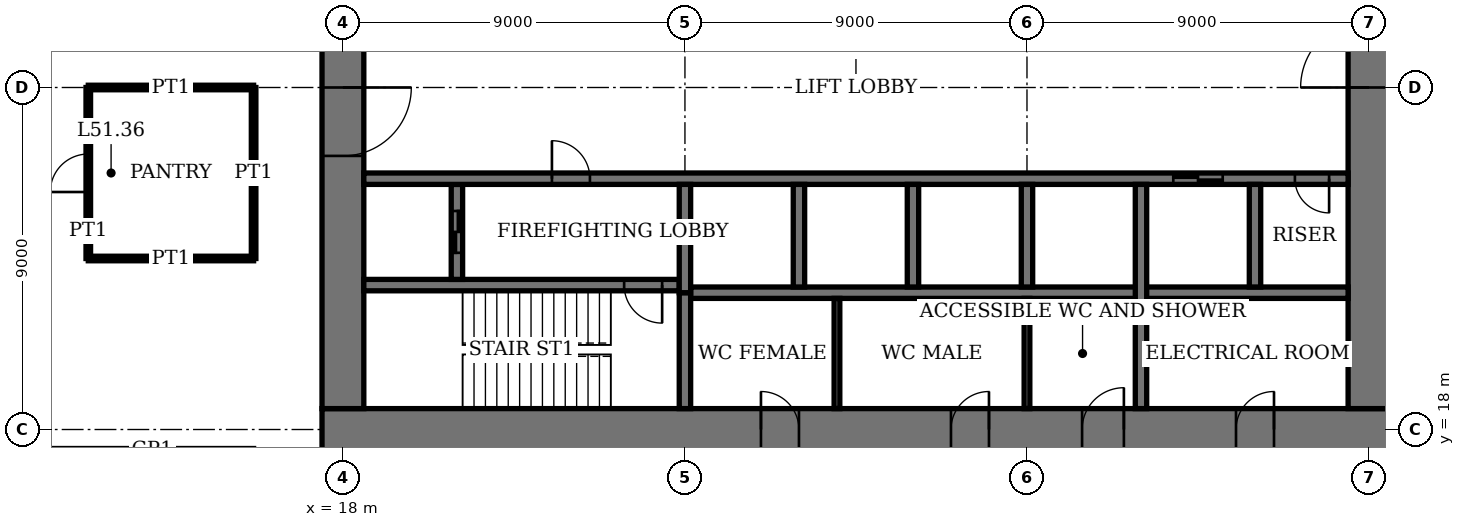
"""IFC4 building model, lengths in metres.
Left out: names, types, materials, properties, quantities, classifications, styles, units other than length and angle.
Written with IfcOpenShell. Run it as: python <this file> out.ifc"""

import sys

from ifc_helpers import new_model, si_unit, direction, frame, frame_2d, origin, place, context, subcontext, project, spatial, rectangle, extrude, element, fill, save


model = new_model("IFC4")
c1 = context("Model", 3, precision=1e-05, world=origin(), true_north=direction((0.0, 1.0)))
c2 = subcontext(c1, "Body", "Model", "MODEL_VIEW")
j1 = project(units=[si_unit("LENGTHUNIT", "METRE"), si_unit("PLANEANGLEUNIT", "RADIAN")], contexts=[c1])
p1 = place(None, origin())
s1 = spatial("IfcSite", under=j1, at=p1, CompositionType="ELEMENT")
p2 = place(p1, origin())
s2 = spatial("IfcBuilding", under=s1, at=p2, CompositionType="ELEMENT")
p3 = place(p2, frame((0.0, 0.0, 210.2)))
s3 = spatial("IfcBuildingStorey", under=s2, at=p3, CompositionType="ELEMENT", Elevation=210.2)
p4 = place(p3, frame((17.45, 18.0, 0.0), z_axis=(0.0, 0.0, 1.0), x_axis=(1.0, 0.0, 0.0)))
e1 = element("IfcWall", 1, at=p4, inside=s3, PredefinedType="SHEAR", context=c2, shape_type="SweptSolid", body=[
    extrude(rectangle(XDim=28.1, YDim=1.1, at=frame_2d((14.05, 0.0))), origin(), (0.0, 0.0, 1.0), 4.0),
])
p5 = place(p4, frame((11.55, 0.0, 0.0)))
e2 = element("IfcOpeningElement", 2, at=p5, cuts=e1, PredefinedType="OPENING", context=c2, shape_type="SweptSolid", body=[
    extrude(rectangle(XDim=1.0, YDim=2.4, at=frame_2d((0.5, 1.2))), frame((0.0, 0.56, 0.0), z_axis=(0.0, -1.0, 0.0), x_axis=(1.0, 0.0, 0.0)), (0.0, 0.0, 1.0), 1.12),
])
p6 = place(p4, frame((16.55, 0.0, 0.0)))
e3 = element("IfcOpeningElement", 3, at=p6, cuts=e1, PredefinedType="OPENING", context=c2, shape_type="SweptSolid", body=[
    extrude(rectangle(XDim=1.0, YDim=2.4, at=frame_2d((0.5, 1.2))), frame((0.0, 0.56, 0.0), z_axis=(0.0, -1.0, 0.0), x_axis=(1.0, 0.0, 0.0)), (0.0, 0.0, 1.0), 1.12),
])
p7 = place(p4, frame((20.0, 0.0, 0.0)))
e4 = element("IfcOpeningElement", 4, at=p7, cuts=e1, PredefinedType="OPENING", context=c2, shape_type="SweptSolid", body=[
    extrude(rectangle(XDim=1.1, YDim=2.4, at=frame_2d((0.55, 1.2))), frame((0.0, 0.56, 0.0), z_axis=(0.0, -1.0, 0.0), x_axis=(1.0, 0.0, 0.0)), (0.0, 0.0, 1.0), 1.12),
])
p8 = place(p4, frame((24.05, 0.0, 0.0)))
e5 = element("IfcOpeningElement", 5, at=p8, cuts=e1, PredefinedType="OPENING", context=c2, shape_type="SweptSolid", body=[
    extrude(rectangle(XDim=1.0, YDim=2.4, at=frame_2d((0.5, 1.2))), frame((0.0, 0.56, 0.0), z_axis=(0.0, -1.0, 0.0), x_axis=(1.0, 0.0, 0.0)), (0.0, 0.0, 1.0), 1.12),
])
p9 = place(p3, frame((18.0, 35.45, 0.0), z_axis=(0.0, 0.0, 1.0), x_axis=(0.0, -1.0, 0.0)))
e6 = element("IfcWall", 6, at=p9, inside=s3, PredefinedType="SHEAR", context=c2, shape_type="SweptSolid", body=[
    extrude(rectangle(XDim=16.9, YDim=1.1, at=frame_2d((8.45, 0.0))), origin(), (0.0, 0.0, 1.0), 4.0),
])
p10 = place(p9, frame((8.45, 0.0, 0.0)))
e7 = element("IfcOpeningElement", 7, at=p10, cuts=e6, PredefinedType="OPENING", context=c2, shape_type="SweptSolid", body=[
    extrude(rectangle(XDim=1.8, YDim=2.4, at=frame_2d((0.9, 1.2))), frame((0.0, 0.56, 0.0), z_axis=(0.0, -1.0, 0.0), x_axis=(1.0, 0.0, 0.0)), (0.0, 0.0, 1.0), 1.12),
])
p11 = place(p3, frame((45.0, 18.55, 0.0), z_axis=(0.0, 0.0, 1.0), x_axis=(0.0, 1.0, 0.0)))
e8 = element("IfcWall", 8, at=p11, inside=s3, PredefinedType="SHEAR", context=c2, shape_type="SweptSolid", body=[
    extrude(rectangle(XDim=16.9, YDim=1.1, at=frame_2d((8.45, 0.0))), origin(), (0.0, 0.0, 1.0), 4.0),
])
p12 = place(p11, frame((8.45, 0.0, 0.0)))
e9 = element("IfcOpeningElement", 9, at=p12, cuts=e8, PredefinedType="OPENING", context=c2, shape_type="SweptSolid", body=[
    extrude(rectangle(XDim=1.8, YDim=2.4, at=frame_2d((0.9, 1.2))), frame((0.0, 0.56, 0.0), z_axis=(0.0, -1.0, 0.0), x_axis=(1.0, 0.0, 0.0)), (0.0, 0.0, 1.0), 1.12),
])
p13 = place(p3, frame((18.55, 21.8, 0.0), z_axis=(0.0, 0.0, 1.0), x_axis=(1.0, 0.0, 0.0)))
e10 = element("IfcWall", 10, at=p13, inside=s3, PredefinedType="SHEAR", context=c2, shape_type="SweptSolid", body=[
    extrude(rectangle(XDim=8.3, YDim=0.3, at=frame_2d((4.15, 0.0))), origin(), (0.0, 0.0, 1.0), 4.0),
])
p14 = place(p13, frame((6.85, 0.0, 0.0)))
e11 = element("IfcOpeningElement", 11, at=p14, cuts=e10, PredefinedType="OPENING", context=c2, shape_type="SweptSolid", body=[
    extrude(rectangle(XDim=1.0, YDim=2.4, at=frame_2d((0.5, 1.2))), frame((0.0, 0.16, 0.0), z_axis=(0.0, -1.0, 0.0), x_axis=(1.0, 0.0, 0.0)), (0.0, 0.0, 1.0), 0.32),
])
p15 = place(p3, frame((27.0, 18.55, 0.0), z_axis=(0.0, 0.0, 1.0), x_axis=(0.0, 1.0, 0.0)))
e12 = element("IfcWall", 12, at=p15, inside=s3, PredefinedType="SHEAR", context=c2, shape_type="SweptSolid", body=[
    extrude(rectangle(XDim=3.05, YDim=0.3, at=frame_2d((1.525, 0.0))), origin(), (0.0, 0.0, 1.0), 4.0),
])
p16 = place(p3, frame((21.0, 21.95, 0.0), z_axis=(0.0, 0.0, 1.0), x_axis=(0.0, 1.0, 0.0)))
e13 = element("IfcWall", 13, at=p16, inside=s3, PredefinedType="SHEAR", context=c2, shape_type="SweptSolid", body=[
    extrude(rectangle(XDim=2.5, YDim=0.3, at=frame_2d((1.25, 0.0))), origin(), (0.0, 0.0, 1.0), 4.0),
])
p17 = place(p16, frame((0.7, 0.0, 0.0)))
e14 = element("IfcOpeningElement", 14, at=p17, cuts=e13, PredefinedType="OPENING", context=c2, shape_type="SweptSolid", body=[
    extrude(rectangle(XDim=1.1, YDim=2.4, at=frame_2d((0.55, 1.2))), frame((0.0, 0.16, 0.0), z_axis=(0.0, -1.0, 0.0), x_axis=(1.0, 0.0, 0.0)), (0.0, 0.0, 1.0), 0.32),
])
p18 = place(p3, frame((18.55, 24.6, 0.0), z_axis=(0.0, 0.0, 1.0), x_axis=(1.0, 0.0, 0.0)))
e15 = element("IfcWall", 15, at=p18, inside=s3, PredefinedType="SHEAR", context=c2, shape_type="SweptSolid", body=[
    extrude(rectangle(XDim=25.9, YDim=0.3, at=frame_2d((12.95, 0.0))), origin(), (0.0, 0.0, 1.0), 4.0),
])
p19 = place(p18, frame((4.95, 0.0, 0.0)))
e16 = element("IfcOpeningElement", 16, at=p19, cuts=e15, PredefinedType="OPENING", context=c2, shape_type="SweptSolid", body=[
    extrude(rectangle(XDim=1.0, YDim=2.4, at=frame_2d((0.5, 1.2))), frame((0.0, 0.16, 0.0), z_axis=(0.0, -1.0, 0.0), x_axis=(1.0, 0.0, 0.0)), (0.0, 0.0, 1.0), 0.32),
])
p20 = place(p18, frame((24.5, 0.0, 0.0)))
e17 = element("IfcOpeningElement", 17, at=p20, cuts=e15, PredefinedType="OPENING", context=c2, shape_type="SweptSolid", body=[
    extrude(rectangle(XDim=0.9, YDim=2.1, at=frame_2d((0.45, 1.05))), frame((0.0, 0.16, 0.0), z_axis=(0.0, -1.0, 0.0), x_axis=(1.0, 0.0, 0.0)), (0.0, 0.0, 1.0), 0.32),
])
p21 = place(p18, frame((21.3, 0.0, 0.0)))
e18 = element("IfcOpeningElement", 18, at=p21, cuts=e15, PredefinedType="OPENING", context=c2, shape_type="SweptSolid", body=[
    extrude(rectangle(XDim=1.3, YDim=2.4, at=frame_2d((0.65, 1.2))), frame((0.0, 0.16, 0.0), z_axis=(0.0, -1.0, 0.0), x_axis=(1.0, 0.0, 0.0)), (0.0, 0.0, 1.0), 0.32),
])
p22 = place(p3, frame((27.15, 21.6, 0.0), z_axis=(0.0, 0.0, 1.0), x_axis=(1.0, 0.0, 0.0)))
e19 = element("IfcWall", 19, at=p22, inside=s3, PredefinedType="SHEAR", context=c2, shape_type="SweptSolid", body=[
    extrude(rectangle(XDim=17.3, YDim=0.3, at=frame_2d((8.65, 0.0))), origin(), (0.0, 0.0, 1.0), 4.0),
])
for number, where, z_axis, x_axis in (
    (20, (30.0, 21.75, 0.0), (0.0, 0.0, 1.0), (0.0, 1.0, 0.0)),
    (21, (33.0, 21.75, 0.0), (0.0, 0.0, 1.0), (0.0, 1.0, 0.0)),
    (22, (36.0, 21.75, 0.0), (0.0, 0.0, 1.0), (0.0, 1.0, 0.0)),
):
    element("IfcWall", number, at=place(p3, frame(where, z_axis=z_axis, x_axis=x_axis)), inside=s3, PredefinedType="SHEAR", context=c2, shape_type="SweptSolid", body=[
        extrude(rectangle(XDim=2.7, YDim=0.3, at=frame_2d((1.35, 0.0))), origin(), (0.0, 0.0, 1.0), 4.0),
    ])
p23 = place(p3, frame((39.0, 18.55, 0.0), z_axis=(0.0, 0.0, 1.0), x_axis=(0.0, 1.0, 0.0)))
e23 = element("IfcWall", 23, at=p23, inside=s3, PredefinedType="SHEAR", context=c2, shape_type="SweptSolid", body=[
    extrude(rectangle(XDim=5.9, YDim=0.3, at=frame_2d((2.95, 0.0))), origin(), (0.0, 0.0, 1.0), 4.0),
])
p24 = place(p3, frame((42.0, 21.75, 0.0), z_axis=(0.0, 0.0, 1.0), x_axis=(0.0, 1.0, 0.0)))
e24 = element("IfcWall", 24, at=p24, inside=s3, PredefinedType="SHEAR", context=c2, shape_type="SweptSolid", body=[
    extrude(rectangle(XDim=2.7, YDim=0.3, at=frame_2d((1.35, 0.0))), origin(), (0.0, 0.0, 1.0), 4.0),
])
p25 = place(p3, frame((27.0, 21.6, 0.0), z_axis=(0.0, 0.0, 1.0), x_axis=(0.0, 1.0, 0.0)))
e25 = element("IfcWall", 25, at=p25, inside=s3, PredefinedType="SHEAR", context=c2, shape_type="SweptSolid", body=[
    extrude(rectangle(XDim=2.85, YDim=0.3, at=frame_2d((1.425, 0.0))), origin(), (0.0, 0.0, 1.0), 4.0),
])
p26 = place(p3, frame((11.3, 22.5, 0.0), z_axis=(0.0, 0.0, 1.0), x_axis=(1.0, 0.0, 0.0)))
e26 = element("IfcWall", 26, at=p26, inside=s3, PredefinedType="PARTITIONING", context=c2, shape_type="SweptSolid", body=[
    extrude(rectangle(XDim=4.35, YDim=0.12, at=frame_2d((2.175, 0.0))), origin(), (0.0, 0.0, 1.0), 3.1),
])
p27 = place(p3, frame((11.3, 27.0, 0.0), z_axis=(0.0, 0.0, 1.0), x_axis=(1.0, 0.0, 0.0)))
e27 = element("IfcWall", 27, at=p27, inside=s3, PredefinedType="PARTITIONING", context=c2, shape_type="SweptSolid", body=[
    extrude(rectangle(XDim=4.35, YDim=0.12, at=frame_2d((2.175, 0.0))), origin(), (0.0, 0.0, 1.0), 3.05),
])
p28 = place(p3, frame((11.3, 22.5, 0.0), z_axis=(0.0, 0.0, 1.0), x_axis=(0.0, 1.0, 0.0)))
e28 = element("IfcWall", 28, at=p28, inside=s3, PredefinedType="PARTITIONING", context=c2, shape_type="SweptSolid", body=[
    extrude(rectangle(XDim=4.5, YDim=0.12, at=frame_2d((2.25, 0.0))), origin(), (0.0, 0.0, 1.0), 3.75),
])
p29 = place(p28, frame((1.75, 0.0, 0.0)))
e29 = element("IfcOpeningElement", 29, at=p29, cuts=e28, PredefinedType="OPENING", context=c2, shape_type="SweptSolid", body=[
    extrude(rectangle(XDim=1.0, YDim=2.4, at=frame_2d((0.5, 1.2))), frame((0.0, 0.07, 0.0), z_axis=(0.0, -1.0, 0.0), x_axis=(1.0, 0.0, 0.0)), (0.0, 0.0, 1.0), 0.14),
])
p30 = place(p3, frame((15.65, 22.5, 0.0), z_axis=(0.0, 0.0, 1.0), x_axis=(0.0, 1.0, 0.0)))
e30 = element("IfcWall", 30, at=p30, inside=s3, PredefinedType="PARTITIONING", context=c2, shape_type="SweptSolid", body=[
    extrude(rectangle(XDim=4.5, YDim=0.12, at=frame_2d((2.25, 0.0))), origin(), (0.0, 0.0, 1.0), 3.75),
])
for number, where, z_axis, x_axis in (
    (31, (31.0, 18.55, 0.0), (0.0, 0.0, 1.0), (0.0, 1.0, 0.0)),
    (32, (36.0, 18.55, 0.0), (0.0, 0.0, 1.0), (0.0, 1.0, 0.0)),
):
    element("IfcWall", number, at=place(p3, frame(where, z_axis=z_axis, x_axis=x_axis)), inside=s3, PredefinedType="PARTITIONING", context=c2, shape_type="SweptSolid", body=[
        extrude(rectangle(XDim=2.9, YDim=0.15, at=frame_2d((1.45, 0.0))), origin(), (0.0, 0.0, 1.0), 3.75),
    ])
p31 = place(p10, origin())
e33 = element("IfcDoor", 33, at=p31, inside=s3, OperationType="DOUBLE_DOOR_DOUBLE_SWING", PredefinedType="DOOR", context=c2, shape_type="SweptSolid", body=[
    extrude(rectangle(XDim=1.8, YDim=2.4, at=frame_2d((0.9, 1.2))), frame((0.0, 0.03, 0.0), z_axis=(0.0, -1.0, 0.0), x_axis=(1.0, 0.0, 0.0)), (0.0, 0.0, 1.0), 0.06),
    extrude(rectangle(XDim=0.04, YDim=2.4, at=frame_2d((0.02, 1.2))), frame((0.0, 0.55, 0.0), z_axis=(0.0, -1.0, 0.0), x_axis=(1.0, 0.0, 0.0)), (0.0, 0.0, 1.0), 1.1),
    extrude(rectangle(XDim=0.04, YDim=2.4, at=frame_2d((1.78, 1.2))), frame((0.0, 0.55, 0.0), z_axis=(0.0, -1.0, 0.0), x_axis=(1.0, 0.0, 0.0)), (0.0, 0.0, 1.0), 1.1),
    extrude(rectangle(XDim=1.8, YDim=0.04, at=frame_2d((0.9, 2.38))), frame((0.0, 0.55, 0.0), z_axis=(0.0, -1.0, 0.0), x_axis=(1.0, 0.0, 0.0)), (0.0, 0.0, 1.0), 1.1),
])
fill(e7, e33)
p32 = place(p12, origin())
e34 = element("IfcDoor", 34, at=p32, inside=s3, OperationType="DOUBLE_DOOR_DOUBLE_SWING", PredefinedType="DOOR", context=c2, shape_type="SweptSolid", body=[
    extrude(rectangle(XDim=1.8, YDim=2.4, at=frame_2d((0.9, 1.2))), frame((0.0, 0.03, 0.0), z_axis=(0.0, -1.0, 0.0), x_axis=(1.0, 0.0, 0.0)), (0.0, 0.0, 1.0), 0.06),
    extrude(rectangle(XDim=0.04, YDim=2.4, at=frame_2d((0.02, 1.2))), frame((0.0, 0.55, 0.0), z_axis=(0.0, -1.0, 0.0), x_axis=(1.0, 0.0, 0.0)), (0.0, 0.0, 1.0), 1.1),
    extrude(rectangle(XDim=0.04, YDim=2.4, at=frame_2d((1.78, 1.2))), frame((0.0, 0.55, 0.0), z_axis=(0.0, -1.0, 0.0), x_axis=(1.0, 0.0, 0.0)), (0.0, 0.0, 1.0), 1.1),
    extrude(rectangle(XDim=1.8, YDim=0.04, at=frame_2d((0.9, 2.38))), frame((0.0, 0.55, 0.0), z_axis=(0.0, -1.0, 0.0), x_axis=(1.0, 0.0, 0.0)), (0.0, 0.0, 1.0), 1.1),
])
fill(e9, e34)
p33 = place(p5, origin())
e35 = element("IfcDoor", 35, at=p33, inside=s3, OperationType="SINGLE_SWING_RIGHT", PredefinedType="DOOR", context=c2, shape_type="SweptSolid", body=[
    extrude(rectangle(XDim=1.0, YDim=2.4, at=frame_2d((0.5, 1.2))), frame((0.0, 0.025, 0.0), z_axis=(0.0, -1.0, 0.0), x_axis=(1.0, 0.0, 0.0)), (0.0, 0.0, 1.0), 0.05),
    extrude(rectangle(XDim=0.04, YDim=2.4, at=frame_2d((0.02, 1.2))), frame((0.0, 0.4, 0.0), z_axis=(0.0, -1.0, 0.0), x_axis=(1.0, 0.0, 0.0)), (0.0, 0.0, 1.0), 0.8),
    extrude(rectangle(XDim=0.04, YDim=2.4, at=frame_2d((0.98, 1.2))), frame((0.0, 0.4, 0.0), z_axis=(0.0, -1.0, 0.0), x_axis=(1.0, 0.0, 0.0)), (0.0, 0.0, 1.0), 0.8),
    extrude(rectangle(XDim=1.0, YDim=0.04, at=frame_2d((0.5, 2.38))), frame((0.0, 0.4, 0.0), z_axis=(0.0, -1.0, 0.0), x_axis=(1.0, 0.0, 0.0)), (0.0, 0.0, 1.0), 0.8),
])
fill(e2, e35)
p34 = place(p6, origin())
e36 = element("IfcDoor", 36, at=p34, inside=s3, OperationType="SINGLE_SWING_LEFT", PredefinedType="DOOR", context=c2, shape_type="SweptSolid", body=[
    extrude(rectangle(XDim=1.0, YDim=2.4, at=frame_2d((0.5, 1.2))), frame((0.0, 0.025, 0.0), z_axis=(0.0, -1.0, 0.0), x_axis=(1.0, 0.0, 0.0)), (0.0, 0.0, 1.0), 0.05),
    extrude(rectangle(XDim=0.04, YDim=2.4, at=frame_2d((0.02, 1.2))), frame((0.0, 0.4, 0.0), z_axis=(0.0, -1.0, 0.0), x_axis=(1.0, 0.0, 0.0)), (0.0, 0.0, 1.0), 0.8),
    extrude(rectangle(XDim=0.04, YDim=2.4, at=frame_2d((0.98, 1.2))), frame((0.0, 0.4, 0.0), z_axis=(0.0, -1.0, 0.0), x_axis=(1.0, 0.0, 0.0)), (0.0, 0.0, 1.0), 0.8),
    extrude(rectangle(XDim=1.0, YDim=0.04, at=frame_2d((0.5, 2.38))), frame((0.0, 0.4, 0.0), z_axis=(0.0, -1.0, 0.0), x_axis=(1.0, 0.0, 0.0)), (0.0, 0.0, 1.0), 0.8),
])
fill(e3, e36)
p35 = place(p7, origin())
e37 = element("IfcDoor", 37, at=p35, inside=s3, OperationType="SINGLE_SWING_LEFT", PredefinedType="DOOR", context=c2, shape_type="SweptSolid", body=[
    extrude(rectangle(XDim=1.1, YDim=2.4, at=frame_2d((0.55, 1.2))), frame((0.0, 0.025, 0.0), z_axis=(0.0, -1.0, 0.0), x_axis=(1.0, 0.0, 0.0)), (0.0, 0.0, 1.0), 0.05),
    extrude(rectangle(XDim=0.04, YDim=2.4, at=frame_2d((0.02, 1.2))), frame((0.0, 0.44, 0.0), z_axis=(0.0, -1.0, 0.0), x_axis=(1.0, 0.0, 0.0)), (0.0, 0.0, 1.0), 0.88),
    extrude(rectangle(XDim=0.04, YDim=2.4, at=frame_2d((1.08, 1.2))), frame((0.0, 0.44, 0.0), z_axis=(0.0, -1.0, 0.0), x_axis=(1.0, 0.0, 0.0)), (0.0, 0.0, 1.0), 0.88),
    extrude(rectangle(XDim=1.1, YDim=0.04, at=frame_2d((0.55, 2.38))), frame((0.0, 0.44, 0.0), z_axis=(0.0, -1.0, 0.0), x_axis=(1.0, 0.0, 0.0)), (0.0, 0.0, 1.0), 0.88),
])
fill(e4, e37)
p36 = place(p8, origin())
e38 = element("IfcDoor", 38, at=p36, inside=s3, OperationType="SINGLE_SWING_LEFT", PredefinedType="DOOR", context=c2, shape_type="SweptSolid", body=[
    extrude(rectangle(XDim=1.0, YDim=2.4, at=frame_2d((0.5, 1.2))), frame((0.0, 0.025, 0.0), z_axis=(0.0, -1.0, 0.0), x_axis=(1.0, 0.0, 0.0)), (0.0, 0.0, 1.0), 0.05),
    extrude(rectangle(XDim=0.04, YDim=2.4, at=frame_2d((0.02, 1.2))), frame((0.0, 0.4, 0.0), z_axis=(0.0, -1.0, 0.0), x_axis=(1.0, 0.0, 0.0)), (0.0, 0.0, 1.0), 0.8),
    extrude(rectangle(XDim=0.04, YDim=2.4, at=frame_2d((0.98, 1.2))), frame((0.0, 0.4, 0.0), z_axis=(0.0, -1.0, 0.0), x_axis=(1.0, 0.0, 0.0)), (0.0, 0.0, 1.0), 0.8),
    extrude(rectangle(XDim=1.0, YDim=0.04, at=frame_2d((0.5, 2.38))), frame((0.0, 0.4, 0.0), z_axis=(0.0, -1.0, 0.0), x_axis=(1.0, 0.0, 0.0)), (0.0, 0.0, 1.0), 0.8),
])
fill(e5, e38)
p37 = place(p14, origin())
e39 = element("IfcDoor", 39, at=p37, inside=s3, OperationType="SINGLE_SWING_RIGHT", PredefinedType="DOOR", context=c2, shape_type="SweptSolid", body=[
    extrude(rectangle(XDim=1.0, YDim=2.4, at=frame_2d((0.5, 1.2))), frame((0.0, 0.03, 0.0), z_axis=(0.0, -1.0, 0.0), x_axis=(1.0, 0.0, 0.0)), (0.0, 0.0, 1.0), 0.06),
])
fill(e11, e39)
p38 = place(p19, origin())
e40 = element("IfcDoor", 40, at=p38, inside=s3, OperationType="SINGLE_SWING_RIGHT", PredefinedType="DOOR", context=c2, shape_type="SweptSolid", body=[
    extrude(rectangle(XDim=1.0, YDim=2.4, at=frame_2d((0.5, 1.2))), frame((0.0, 0.03, 0.0), z_axis=(0.0, -1.0, 0.0), x_axis=(1.0, 0.0, 0.0)), (0.0, 0.0, 1.0), 0.06),
])
fill(e16, e40)
p39 = place(p20, origin())
e41 = element("IfcDoor", 41, at=p39, inside=s3, OperationType="SINGLE_SWING_RIGHT", PredefinedType="DOOR", context=c2, shape_type="SweptSolid", body=[
    extrude(rectangle(XDim=0.9, YDim=2.1, at=frame_2d((0.45, 1.05))), frame((0.0, 0.03, 0.0), z_axis=(0.0, -1.0, 0.0), x_axis=(1.0, 0.0, 0.0)), (0.0, 0.0, 1.0), 0.06),
])
fill(e17, e41)
p40 = place(p29, origin())
e42 = element("IfcDoor", 42, at=p40, inside=s3, OperationType="SINGLE_SWING_RIGHT", PredefinedType="DOOR", context=c2, shape_type="SweptSolid", body=[
    extrude(rectangle(XDim=1.0, YDim=2.4, at=frame_2d((0.5, 1.2))), frame((0.0, 0.025, 0.0), z_axis=(0.0, -1.0, 0.0), x_axis=(1.0, 0.0, 0.0)), (0.0, 0.0, 1.0), 0.05),
])
fill(e29, e42)
p41 = place(p21, origin())
e43 = element("IfcDoor", 43, at=p41, inside=s3, OperationType="DOUBLE_DOOR_SLIDING", PredefinedType="DOOR", context=c2, shape_type="SweptSolid", body=[
    extrude(rectangle(XDim=1.3, YDim=2.4, at=frame_2d((0.65, 1.2))), frame((0.0, 0.02, 0.0), z_axis=(0.0, -1.0, 0.0), x_axis=(1.0, 0.0, 0.0)), (0.0, 0.0, 1.0), 0.04),
])
fill(e18, e43)
p42 = place(p17, origin())
e44 = element("IfcDoor", 44, at=p42, inside=s3, OperationType="DOUBLE_DOOR_SLIDING", PredefinedType="DOOR", context=c2, shape_type="SweptSolid", body=[
    extrude(rectangle(XDim=1.1, YDim=2.4, at=frame_2d((0.55, 1.2))), frame((0.0, 0.03, 0.0), z_axis=(0.0, -1.0, 0.0), x_axis=(1.0, 0.0, 0.0)), (0.0, 0.0, 1.0), 0.06),
])
fill(e14, e44)
save(model, sys.argv[1])
